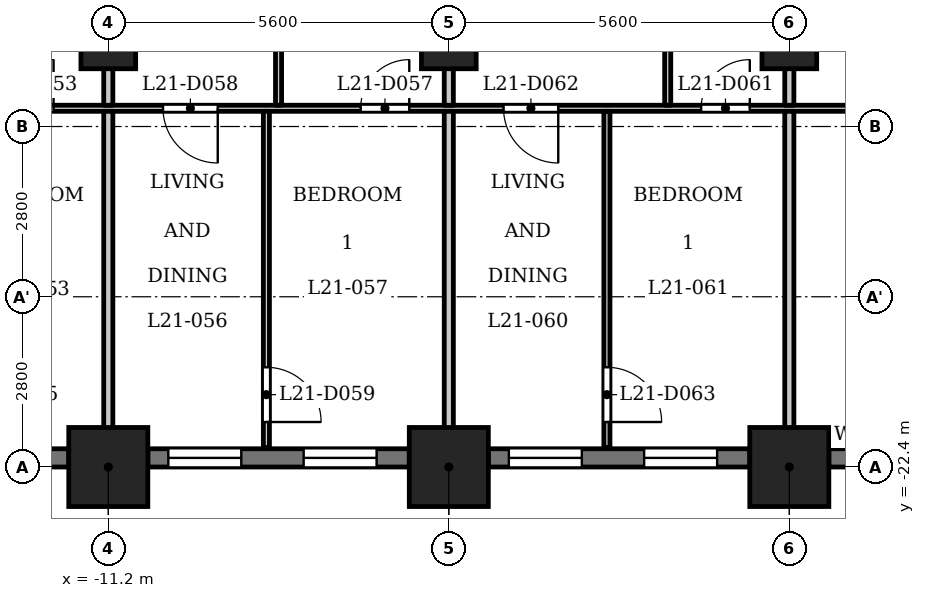
"""IFC4 building model, lengths in metres.
Left out: names, types, materials, properties, quantities, classifications, styles, units other than length and angle.
Written with IfcOpenShell. Run it as: python <this file> out.ifc"""

import sys

from ifc_helpers import new_model, si_unit, direction, frame, frame_2d, origin, origin_2d, place, context, subcontext, project, spatial, rectangle, extrude, element, fill, save


model = new_model("IFC4")
c1 = context("Model", 3, precision=1e-05, world=origin(), true_north=direction((0.0, 1.0)))
c2 = subcontext(c1, "Body", "Model", "MODEL_VIEW")
j1 = project(units=[si_unit("LENGTHUNIT", "METRE"), si_unit("PLANEANGLEUNIT", "RADIAN")], contexts=[c1])
p1 = place(None, origin())
s1 = spatial("IfcSite", under=j1, at=p1, CompositionType="ELEMENT")
p2 = place(p1, origin())
s2 = spatial("IfcBuilding", under=s1, at=p2, CompositionType="ELEMENT")
p3 = place(p2, frame((0.0, 0.0, 86.8)))
s3 = spatial("IfcBuildingStorey", under=s2, at=p3, CompositionType="ELEMENT", Elevation=86.8)
for number, where, z_axis, x_axis in (
    (1, (-11.2, -22.4, 0.0), (0.0, 0.0, 1.0), (1.0, 0.0, 0.0)),
    (2, (-5.6, -22.4, 0.0), (0.0, 0.0, 1.0), (1.0, 0.0, 0.0)),
    (3, (0.0, -22.4, 0.0), (0.0, 0.0, 1.0), (1.0, 0.0, 0.0)),
):
    element("IfcColumn", number, at=place(p3, frame(where, z_axis=z_axis, x_axis=x_axis)), inside=s3, PredefinedType="COLUMN", context=c2, shape_type="SweptSolid", body=[
        extrude(rectangle(XDim=1.3, YDim=1.3, at=origin_2d()), origin(), (0.0, 0.0, 1.0), 3.5),
    ])
for number, where, z_axis, x_axis in (
    (4, (-11.2, -15.4, 0.0), (0.0, 0.0, 1.0), (1.0, 0.0, 0.0)),
    (5, (-5.6, -15.4, 0.0), (0.0, 0.0, 1.0), (1.0, 0.0, 0.0)),
    (6, (0.0, -15.4, 0.0), (0.0, 0.0, 1.0), (1.0, 0.0, 0.0)),
):
    element("IfcColumn", number, at=place(p3, frame(where, z_axis=z_axis, x_axis=x_axis)), inside=s3, PredefinedType="COLUMN", context=c2, shape_type="SweptSolid", body=[
        extrude(rectangle(XDim=0.9, YDim=0.9, at=origin_2d()), origin(), (0.0, 0.0, 1.0), 3.5),
    ])
p4 = place(p3, frame((-16.15, -22.25, 0.0), z_axis=(0.0, 0.0, 1.0), x_axis=(1.0, 0.0, 0.0)))
e7 = element("IfcWall", 7, at=p4, inside=s3, PredefinedType="SOLIDWALL", context=c2, shape_type="SweptSolid", body=[
    extrude(rectangle(XDim=4.3, YDim=0.3, at=frame_2d((2.15, 0.0))), origin(), (0.0, 0.0, 1.0), 2.4),
])
p5 = place(p4, frame((0.538, 0.0, 0.6)))
e8 = element("IfcOpeningElement", 8, at=p5, cuts=e7, PredefinedType="OPENING", context=c2, shape_type="SweptSolid", body=[
    extrude(rectangle(XDim=1.2, YDim=1.55, at=frame_2d((0.6, 0.775))), frame((0.0, 0.16, 0.0), z_axis=(0.0, -1.0, 0.0), x_axis=(1.0, 0.0, 0.0)), (0.0, 0.0, 1.0), 0.32),
])
p6 = place(p4, frame((2.762, 0.0, 0.6)))
e9 = element("IfcOpeningElement", 9, at=p6, cuts=e7, PredefinedType="OPENING", context=c2, shape_type="SweptSolid", body=[
    extrude(rectangle(XDim=1.2, YDim=1.55, at=frame_2d((0.6, 0.775))), frame((0.0, 0.16, 0.0), z_axis=(0.0, -1.0, 0.0), x_axis=(1.0, 0.0, 0.0)), (0.0, 0.0, 1.0), 0.32),
])
p7 = place(p3, frame((-10.55, -22.25, 0.0), z_axis=(0.0, 0.0, 1.0), x_axis=(1.0, 0.0, 0.0)))
e10 = element("IfcWall", 10, at=p7, inside=s3, PredefinedType="SOLIDWALL", context=c2, shape_type="SweptSolid", body=[
    extrude(rectangle(XDim=4.3, YDim=0.3, at=frame_2d((2.15, 0.0))), origin(), (0.0, 0.0, 1.0), 2.4),
])
p8 = place(p7, frame((0.337, 0.0, 0.6)))
e11 = element("IfcOpeningElement", 11, at=p8, cuts=e10, PredefinedType="OPENING", context=c2, shape_type="SweptSolid", body=[
    extrude(rectangle(XDim=1.2, YDim=1.55, at=frame_2d((0.6, 0.775))), frame((0.0, 0.16, 0.0), z_axis=(0.0, -1.0, 0.0), x_axis=(1.0, 0.0, 0.0)), (0.0, 0.0, 1.0), 0.32),
])
p9 = place(p7, frame((2.562, 0.0, 0.6)))
e12 = element("IfcOpeningElement", 12, at=p9, cuts=e10, PredefinedType="OPENING", context=c2, shape_type="SweptSolid", body=[
    extrude(rectangle(XDim=1.2, YDim=1.55, at=frame_2d((0.6, 0.775))), frame((0.0, 0.16, 0.0), z_axis=(0.0, -1.0, 0.0), x_axis=(1.0, 0.0, 0.0)), (0.0, 0.0, 1.0), 0.32),
])
p10 = place(p3, frame((-4.95, -22.25, 0.0), z_axis=(0.0, 0.0, 1.0), x_axis=(1.0, 0.0, 0.0)))
e13 = element("IfcWall", 13, at=p10, inside=s3, PredefinedType="SOLIDWALL", context=c2, shape_type="SweptSolid", body=[
    extrude(rectangle(XDim=4.3, YDim=0.3, at=frame_2d((2.15, 0.0))), origin(), (0.0, 0.0, 1.0), 2.4),
])
p11 = place(p10, frame((0.337, 0.0, 0.6)))
e14 = element("IfcOpeningElement", 14, at=p11, cuts=e13, PredefinedType="OPENING", context=c2, shape_type="SweptSolid", body=[
    extrude(rectangle(XDim=1.2, YDim=1.55, at=frame_2d((0.6, 0.775))), frame((0.0, 0.16, 0.0), z_axis=(0.0, -1.0, 0.0), x_axis=(1.0, 0.0, 0.0)), (0.0, 0.0, 1.0), 0.32),
])
p12 = place(p10, frame((2.562, 0.0, 0.6)))
e15 = element("IfcOpeningElement", 15, at=p12, cuts=e13, PredefinedType="OPENING", context=c2, shape_type="SweptSolid", body=[
    extrude(rectangle(XDim=1.2, YDim=1.55, at=frame_2d((0.6, 0.775))), frame((0.0, 0.16, 0.0), z_axis=(0.0, -1.0, 0.0), x_axis=(1.0, 0.0, 0.0)), (0.0, 0.0, 1.0), 0.32),
])
p13 = place(p3, frame((0.65, -22.25, 0.0), z_axis=(0.0, 0.0, 1.0), x_axis=(1.0, 0.0, 0.0)))
e16 = element("IfcWall", 16, at=p13, inside=s3, PredefinedType="SOLIDWALL", context=c2, shape_type="SweptSolid", body=[
    extrude(rectangle(XDim=4.3, YDim=0.3, at=frame_2d((2.15, 0.0))), origin(), (0.0, 0.0, 1.0), 2.4),
])
p14 = place(p13, frame((0.35, 0.0, 1.2)))
e17 = element("IfcOpeningElement", 17, at=p14, cuts=e16, PredefinedType="OPENING", context=c2, shape_type="SweptSolid", body=[
    extrude(rectangle(XDim=3.6, YDim=0.95, at=frame_2d((1.8, 0.475))), frame((0.0, 0.16, 0.0), z_axis=(0.0, -1.0, 0.0), x_axis=(1.0, 0.0, 0.0)), (0.0, 0.0, 1.0), 0.32),
])
p15 = place(p3, frame((-16.725, -16.5, 0.0), z_axis=(0.0, 0.0, 1.0), x_axis=(1.0, 0.0, 0.0)))
e18 = element("IfcWall", 18, at=p15, inside=s3, PredefinedType="PARTITIONING", context=c2, shape_type="SweptSolid", body=[
    extrude(rectangle(XDim=33.45, YDim=0.1, at=frame_2d((16.725, 0.0))), origin(), (0.0, 0.0, 1.0), 3.2),
])
p16 = place(p15, frame((3.825, 0.0, 0.0)))
e19 = element("IfcOpeningElement", 19, at=p16, cuts=e18, PredefinedType="OPENING", context=c2, shape_type="SweptSolid", body=[
    extrude(rectangle(XDim=0.8, YDim=2.1, at=frame_2d((0.4, 1.05))), frame((0.0, 0.06, 0.0), z_axis=(0.0, -1.0, 0.0), x_axis=(1.0, 0.0, 0.0)), (0.0, 0.0, 1.0), 0.12),
])
p17 = place(p15, frame((1.825, 0.0, 0.0)))
e20 = element("IfcOpeningElement", 20, at=p17, cuts=e18, PredefinedType="OPENING", context=c2, shape_type="SweptSolid", body=[
    extrude(rectangle(XDim=0.9, YDim=2.1, at=frame_2d((0.45, 1.05))), frame((0.0, 0.06, 0.0), z_axis=(0.0, -1.0, 0.0), x_axis=(1.0, 0.0, 0.0)), (0.0, 0.0, 1.0), 0.12),
])
p18 = place(p15, frame((9.675, 0.0, 0.0)))
e21 = element("IfcOpeningElement", 21, at=p18, cuts=e18, PredefinedType="OPENING", context=c2, shape_type="SweptSolid", body=[
    extrude(rectangle(XDim=0.8, YDim=2.1, at=frame_2d((0.4, 1.05))), frame((0.0, 0.06, 0.0), z_axis=(0.0, -1.0, 0.0), x_axis=(1.0, 0.0, 0.0)), (0.0, 0.0, 1.0), 0.12),
])
p19 = place(p15, frame((6.425, 0.0, 0.0)))
e22 = element("IfcOpeningElement", 22, at=p19, cuts=e18, PredefinedType="OPENING", context=c2, shape_type="SweptSolid", body=[
    extrude(rectangle(XDim=0.9, YDim=2.1, at=frame_2d((0.45, 1.05))), frame((0.0, 0.06, 0.0), z_axis=(0.0, -1.0, 0.0), x_axis=(1.0, 0.0, 0.0)), (0.0, 0.0, 1.0), 0.12),
])
p20 = place(p15, frame((15.275, 0.0, 0.0)))
e23 = element("IfcOpeningElement", 23, at=p20, cuts=e18, PredefinedType="OPENING", context=c2, shape_type="SweptSolid", body=[
    extrude(rectangle(XDim=0.8, YDim=2.1, at=frame_2d((0.4, 1.05))), frame((0.0, 0.06, 0.0), z_axis=(0.0, -1.0, 0.0), x_axis=(1.0, 0.0, 0.0)), (0.0, 0.0, 1.0), 0.12),
])
p21 = place(p15, frame((12.025, 0.0, 0.0)))
e24 = element("IfcOpeningElement", 24, at=p21, cuts=e18, PredefinedType="OPENING", context=c2, shape_type="SweptSolid", body=[
    extrude(rectangle(XDim=0.9, YDim=2.1, at=frame_2d((0.45, 1.05))), frame((0.0, 0.06, 0.0), z_axis=(0.0, -1.0, 0.0), x_axis=(1.0, 0.0, 0.0)), (0.0, 0.0, 1.0), 0.12),
])
p22 = place(p15, frame((20.875, 0.0, 0.0)))
e25 = element("IfcOpeningElement", 25, at=p22, cuts=e18, PredefinedType="OPENING", context=c2, shape_type="SweptSolid", body=[
    extrude(rectangle(XDim=0.8, YDim=2.1, at=frame_2d((0.4, 1.05))), frame((0.0, 0.06, 0.0), z_axis=(0.0, -1.0, 0.0), x_axis=(1.0, 0.0, 0.0)), (0.0, 0.0, 1.0), 0.12),
])
p23 = place(p15, frame((18.625, 0.0, 0.0)))
e26 = element("IfcOpeningElement", 26, at=p23, cuts=e18, PredefinedType="OPENING", context=c2, shape_type="SweptSolid", body=[
    extrude(rectangle(XDim=0.9, YDim=2.1, at=frame_2d((0.45, 1.05))), frame((0.0, 0.06, 0.0), z_axis=(0.0, -1.0, 0.0), x_axis=(1.0, 0.0, 0.0)), (0.0, 0.0, 1.0), 0.12),
])
p24 = place(p15, frame((23.875, 0.0, 0.0)))
e27 = element("IfcOpeningElement", 27, at=p24, cuts=e18, PredefinedType="OPENING", context=c2, shape_type="SweptSolid", body=[
    extrude(rectangle(XDim=0.8, YDim=2.1, at=frame_2d((0.4, 1.05))), frame((0.0, 0.06, 0.0), z_axis=(0.0, -1.0, 0.0), x_axis=(1.0, 0.0, 0.0)), (0.0, 0.0, 1.0), 0.12),
])
p25 = place(p15, frame((26.225, 0.0, 0.0)))
e28 = element("IfcOpeningElement", 28, at=p25, cuts=e18, PredefinedType="OPENING", context=c2, shape_type="SweptSolid", body=[
    extrude(rectangle(XDim=0.9, YDim=2.1, at=frame_2d((0.45, 1.05))), frame((0.0, 0.06, 0.0), z_axis=(0.0, -1.0, 0.0), x_axis=(1.0, 0.0, 0.0)), (0.0, 0.0, 1.0), 0.12),
])
p26 = place(p15, frame((28.575, 0.0, 0.0)))
e29 = element("IfcOpeningElement", 29, at=p26, cuts=e18, PredefinedType="OPENING", context=c2, shape_type="SweptSolid", body=[
    extrude(rectangle(XDim=0.9, YDim=2.1, at=frame_2d((0.45, 1.05))), frame((0.0, 0.06, 0.0), z_axis=(0.0, -1.0, 0.0), x_axis=(1.0, 0.0, 0.0)), (0.0, 0.0, 1.0), 0.12),
])
p27 = place(p15, frame((30.675, 0.0, 0.0)))
e30 = element("IfcOpeningElement", 30, at=p27, cuts=e18, PredefinedType="OPENING", context=c2, shape_type="SweptSolid", body=[
    extrude(rectangle(XDim=0.9, YDim=2.1, at=frame_2d((0.45, 1.05))), frame((0.0, 0.06, 0.0), z_axis=(0.0, -1.0, 0.0), x_axis=(1.0, 0.0, 0.0)), (0.0, 0.0, 1.0), 0.12),
])
p28 = place(p3, frame((-11.2, -23.03, 0.0), z_axis=(0.0, 0.0, 1.0), x_axis=(0.0, 1.0, 0.0)))
e31 = element("IfcWall", 31, at=p28, inside=s3, PredefinedType="PARTITIONING", context=c2, shape_type="SweptSolid", body=[
    extrude(rectangle(XDim=6.48, YDim=0.15, at=frame_2d((3.24, 0.0))), origin(), (0.0, 0.0, 1.0), 3.2),
])
p29 = place(p3, frame((-11.2, -16.45, 0.0), z_axis=(0.0, 0.0, 1.0), x_axis=(0.0, 1.0, 0.0)))
e32 = element("IfcWall", 32, at=p29, inside=s3, PredefinedType="PARTITIONING", context=c2, shape_type="SweptSolid", body=[
    extrude(rectangle(XDim=3.175, YDim=0.15, at=frame_2d((1.587, 0.0))), origin(), (0.0, 0.0, 1.0), 3.2),
])
p30 = place(p3, frame((-8.6, -22.08, 0.0), z_axis=(0.0, 0.0, 1.0), x_axis=(0.0, 1.0, 0.0)))
e33 = element("IfcWall", 33, at=p30, inside=s3, PredefinedType="PARTITIONING", context=c2, shape_type="SweptSolid", body=[
    extrude(rectangle(XDim=5.53, YDim=0.1, at=frame_2d((2.765, 0.0))), origin(), (0.0, 0.0, 1.0), 3.2),
])
p31 = place(p30, frame((0.42, 0.0, 0.0)))
e34 = element("IfcOpeningElement", 34, at=p31, cuts=e33, PredefinedType="OPENING", context=c2, shape_type="SweptSolid", body=[
    extrude(rectangle(XDim=0.9, YDim=2.1, at=frame_2d((0.45, 1.05))), frame((0.0, 0.06, 0.0), z_axis=(0.0, -1.0, 0.0), x_axis=(1.0, 0.0, 0.0)), (0.0, 0.0, 1.0), 0.12),
])
p32 = place(p3, frame((-8.4, -16.45, 0.0), z_axis=(0.0, 0.0, 1.0), x_axis=(0.0, 1.0, 0.0)))
e35 = element("IfcWall", 35, at=p32, inside=s3, PredefinedType="PARTITIONING", context=c2, shape_type="SweptSolid", body=[
    extrude(rectangle(XDim=3.175, YDim=0.1, at=frame_2d((1.587, 0.0))), origin(), (0.0, 0.0, 1.0), 3.2),
])
p33 = place(p3, frame((-5.6, -23.03, 0.0), z_axis=(0.0, 0.0, 1.0), x_axis=(0.0, 1.0, 0.0)))
e36 = element("IfcWall", 36, at=p33, inside=s3, PredefinedType="PARTITIONING", context=c2, shape_type="SweptSolid", body=[
    extrude(rectangle(XDim=6.48, YDim=0.15, at=frame_2d((3.24, 0.0))), origin(), (0.0, 0.0, 1.0), 3.2),
])
p34 = place(p3, frame((-5.6, -16.45, 0.0), z_axis=(0.0, 0.0, 1.0), x_axis=(0.0, 1.0, 0.0)))
e37 = element("IfcWall", 37, at=p34, inside=s3, PredefinedType="PARTITIONING", context=c2, shape_type="SweptSolid", body=[
    extrude(rectangle(XDim=3.175, YDim=0.15, at=frame_2d((1.587, 0.0))), origin(), (0.0, 0.0, 1.0), 3.2),
])
p35 = place(p3, frame((-3.0, -22.08, 0.0), z_axis=(0.0, 0.0, 1.0), x_axis=(0.0, 1.0, 0.0)))
e38 = element("IfcWall", 38, at=p35, inside=s3, PredefinedType="PARTITIONING", context=c2, shape_type="SweptSolid", body=[
    extrude(rectangle(XDim=5.53, YDim=0.1, at=frame_2d((2.765, 0.0))), origin(), (0.0, 0.0, 1.0), 3.2),
])
p36 = place(p35, frame((0.42, 0.0, 0.0)))
e39 = element("IfcOpeningElement", 39, at=p36, cuts=e38, PredefinedType="OPENING", context=c2, shape_type="SweptSolid", body=[
    extrude(rectangle(XDim=0.9, YDim=2.1, at=frame_2d((0.45, 1.05))), frame((0.0, 0.06, 0.0), z_axis=(0.0, -1.0, 0.0), x_axis=(1.0, 0.0, 0.0)), (0.0, 0.0, 1.0), 0.12),
])
p37 = place(p3, frame((-2.0, -16.45, 0.0), z_axis=(0.0, 0.0, 1.0), x_axis=(0.0, 1.0, 0.0)))
e40 = element("IfcWall", 40, at=p37, inside=s3, PredefinedType="PARTITIONING", context=c2, shape_type="SweptSolid", body=[
    extrude(rectangle(XDim=3.175, YDim=0.1, at=frame_2d((1.587, 0.0))), origin(), (0.0, 0.0, 1.0), 3.2),
])
p38 = place(p3, frame((0.0, -23.03, 0.0), z_axis=(0.0, 0.0, 1.0), x_axis=(0.0, 1.0, 0.0)))
e41 = element("IfcWall", 41, at=p38, inside=s3, PredefinedType="PARTITIONING", context=c2, shape_type="SweptSolid", body=[
    extrude(rectangle(XDim=6.48, YDim=0.15, at=frame_2d((3.24, 0.0))), origin(), (0.0, 0.0, 1.0), 3.2),
])
p39 = place(p3, frame((0.0, -16.45, 0.0), z_axis=(0.0, 0.0, 1.0), x_axis=(0.0, 1.0, 0.0)))
e42 = element("IfcWall", 42, at=p39, inside=s3, PredefinedType="PARTITIONING", context=c2, shape_type="SweptSolid", body=[
    extrude(rectangle(XDim=3.175, YDim=0.15, at=frame_2d((1.587, 0.0))), origin(), (0.0, 0.0, 1.0), 3.2),
])
p40 = place(p16, origin())
e43 = element("IfcDoor", 43, at=p40, inside=s3, OperationType="SINGLE_SWING_LEFT", PredefinedType="DOOR", context=c2, shape_type="SweptSolid", body=[
    extrude(rectangle(XDim=0.8, YDim=2.1, at=frame_2d((0.4, 1.05))), frame((0.0, 0.025, 0.0), z_axis=(0.0, -1.0, 0.0), x_axis=(1.0, 0.0, 0.0)), (0.0, 0.0, 1.0), 0.05),
])
fill(e19, e43)
p41 = place(p18, origin())
e44 = element("IfcDoor", 44, at=p41, inside=s3, OperationType="SINGLE_SWING_LEFT", PredefinedType="DOOR", context=c2, shape_type="SweptSolid", body=[
    extrude(rectangle(XDim=0.8, YDim=2.1, at=frame_2d((0.4, 1.05))), frame((0.0, 0.025, 0.0), z_axis=(0.0, -1.0, 0.0), x_axis=(1.0, 0.0, 0.0)), (0.0, 0.0, 1.0), 0.05),
])
fill(e21, e44)
p42 = place(p19, origin())
e45 = element("IfcDoor", 45, at=p42, inside=s3, OperationType="SINGLE_SWING_RIGHT", PredefinedType="DOOR", context=c2, shape_type="SweptSolid", body=[
    extrude(rectangle(XDim=0.9, YDim=2.1, at=frame_2d((0.45, 1.05))), frame((0.0, 0.025, 0.0), z_axis=(0.0, -1.0, 0.0), x_axis=(1.0, 0.0, 0.0)), (0.0, 0.0, 1.0), 0.05),
])
fill(e22, e45)
p43 = place(p31, origin())
e46 = element("IfcDoor", 46, at=p43, inside=s3, OperationType="SINGLE_SWING_LEFT", PredefinedType="DOOR", context=c2, shape_type="SweptSolid", body=[
    extrude(rectangle(XDim=0.9, YDim=2.1, at=frame_2d((0.45, 1.05))), frame((0.0, 0.025, 0.0), z_axis=(0.0, -1.0, 0.0), x_axis=(1.0, 0.0, 0.0)), (0.0, 0.0, 1.0), 0.05),
])
fill(e34, e46)
p44 = place(p20, origin())
e47 = element("IfcDoor", 47, at=p44, inside=s3, OperationType="SINGLE_SWING_LEFT", PredefinedType="DOOR", context=c2, shape_type="SweptSolid", body=[
    extrude(rectangle(XDim=0.8, YDim=2.1, at=frame_2d((0.4, 1.05))), frame((0.0, 0.025, 0.0), z_axis=(0.0, -1.0, 0.0), x_axis=(1.0, 0.0, 0.0)), (0.0, 0.0, 1.0), 0.05),
])
fill(e23, e47)
p45 = place(p21, origin())
e48 = element("IfcDoor", 48, at=p45, inside=s3, OperationType="SINGLE_SWING_RIGHT", PredefinedType="DOOR", context=c2, shape_type="SweptSolid", body=[
    extrude(rectangle(XDim=0.9, YDim=2.1, at=frame_2d((0.45, 1.05))), frame((0.0, 0.025, 0.0), z_axis=(0.0, -1.0, 0.0), x_axis=(1.0, 0.0, 0.0)), (0.0, 0.0, 1.0), 0.05),
])
fill(e24, e48)
p46 = place(p36, origin())
e49 = element("IfcDoor", 49, at=p46, inside=s3, OperationType="SINGLE_SWING_LEFT", PredefinedType="DOOR", context=c2, shape_type="SweptSolid", body=[
    extrude(rectangle(XDim=0.9, YDim=2.1, at=frame_2d((0.45, 1.05))), frame((0.0, 0.025, 0.0), z_axis=(0.0, -1.0, 0.0), x_axis=(1.0, 0.0, 0.0)), (0.0, 0.0, 1.0), 0.05),
])
fill(e39, e49)
p47 = place(p8, origin())
e50 = element("IfcWindow", 50, at=p47, inside=s3, PartitioningType="SINGLE_PANEL", PredefinedType="WINDOW", context=c2, shape_type="SweptSolid", body=[
    extrude(rectangle(XDim=1.2, YDim=1.55, at=frame_2d((0.6, 0.775))), frame((0.0, 0.03, 0.0), z_axis=(0.0, -1.0, 0.0), x_axis=(1.0, 0.0, 0.0)), (0.0, 0.0, 1.0), 0.06),
])
fill(e11, e50)
p48 = place(p9, origin())
e51 = element("IfcWindow", 51, at=p48, inside=s3, PartitioningType="SINGLE_PANEL", PredefinedType="WINDOW", context=c2, shape_type="SweptSolid", body=[
    extrude(rectangle(XDim=1.2, YDim=1.55, at=frame_2d((0.6, 0.775))), frame((0.0, 0.03, 0.0), z_axis=(0.0, -1.0, 0.0), x_axis=(1.0, 0.0, 0.0)), (0.0, 0.0, 1.0), 0.06),
])
fill(e12, e51)
p49 = place(p11, origin())
e52 = element("IfcWindow", 52, at=p49, inside=s3, PartitioningType="SINGLE_PANEL", PredefinedType="WINDOW", context=c2, shape_type="SweptSolid", body=[
    extrude(rectangle(XDim=1.2, YDim=1.55, at=frame_2d((0.6, 0.775))), frame((0.0, 0.03, 0.0), z_axis=(0.0, -1.0, 0.0), x_axis=(1.0, 0.0, 0.0)), (0.0, 0.0, 1.0), 0.06),
])
fill(e14, e52)
p50 = place(p12, origin())
e53 = element("IfcWindow", 53, at=p50, inside=s3, PartitioningType="SINGLE_PANEL", PredefinedType="WINDOW", context=c2, shape_type="SweptSolid", body=[
    extrude(rectangle(XDim=1.2, YDim=1.55, at=frame_2d((0.6, 0.775))), frame((0.0, 0.03, 0.0), z_axis=(0.0, -1.0, 0.0), x_axis=(1.0, 0.0, 0.0)), (0.0, 0.0, 1.0), 0.06),
])
fill(e15, e53)
save(model, sys.argv[1])
